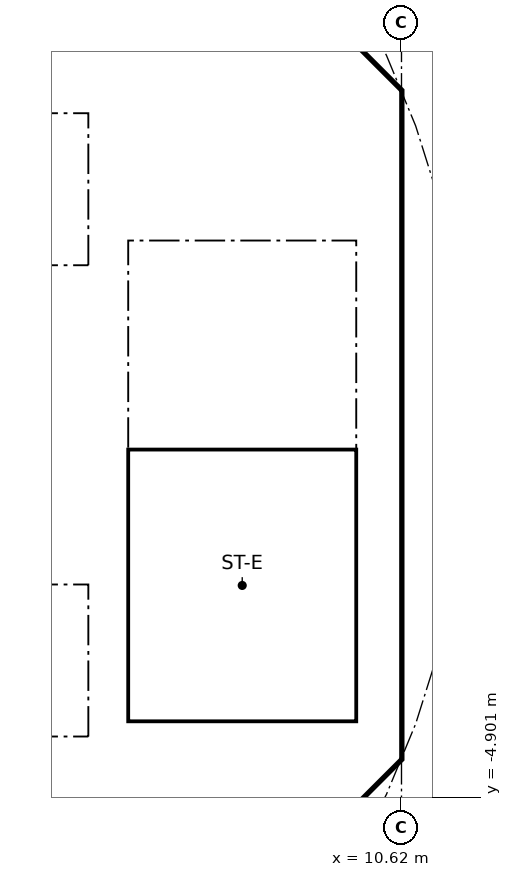
"""IFC4 building model, lengths in metres.
Left out: names, types, materials, properties, quantities, classifications, styles, units other than length and angle.
Written with IfcOpenShell. Run it as: python <this file> out.ifc"""

import sys

from ifc_helpers import new_model, si_unit, direction, frame, frame_2d, origin, place, context, subcontext, project, spatial, polyline, rectangle, outline, extrude, element, fill, save


model = new_model("IFC4")
c1 = context("Model", 3, precision=1e-05, world=origin(), true_north=direction((0.0, 1.0)))
c2 = subcontext(c1, "Body", "Model", "MODEL_VIEW")
j1 = project(units=[si_unit("LENGTHUNIT", "METRE"), si_unit("PLANEANGLEUNIT", "RADIAN")], contexts=[c1])
p1 = place(None, origin())
s1 = spatial("IfcSite", under=j1, at=p1, CompositionType="ELEMENT")
p2 = place(p1, origin())
s2 = spatial("IfcBuilding", under=s1, at=p2, CompositionType="ELEMENT")
p3 = place(p2, frame((0.0, 0.0, 295.5)))
s3 = spatial("IfcBuildingStorey", under=s2, at=p3, CompositionType="ELEMENT", Elevation=295.5)
p4 = place(p3, frame((9.988, 4.613, 0.0), z_axis=(0.0, 0.0, 1.0), x_axis=(-0.707106781187, 0.707106781187, 0.0)))
e1 = element("IfcWall", 1, at=p4, inside=s3, PredefinedType="SHEAR", context=c2, shape_type="SweptSolid", body=[
    extrude(rectangle(XDim=7.602, YDim=0.6, at=frame_2d((3.801, 0.0))), origin(), (0.0, 0.0, 1.0), 3.28),
])
p5 = place(p4, frame((3.201, 0.0, 0.0)))
e2 = element("IfcOpeningElement", 2, at=p5, cuts=e1, PredefinedType="OPENING", context=c2, shape_type="SweptSolid", body=[
    extrude(rectangle(XDim=1.2, YDim=2.1, at=frame_2d((0.6, 1.05))), frame((0.0, 0.31, 0.0), z_axis=(0.0, -1.0, 0.0), x_axis=(1.0, 0.0, 0.0)), (0.0, 0.0, 1.0), 0.62),
])
p6 = place(p3, frame((4.613, -9.988, 0.0), z_axis=(0.0, 0.0, 1.0), x_axis=(0.707106781187, 0.707106781187, 0.0)))
e3 = element("IfcWall", 3, at=p6, inside=s3, PredefinedType="SHEAR", context=c2, shape_type="SweptSolid", body=[
    extrude(rectangle(XDim=7.602, YDim=0.6, at=frame_2d((3.801, 0.0))), origin(), (0.0, 0.0, 1.0), 3.28),
])
p7 = place(p6, frame((3.201, 0.0, 0.0)))
e4 = element("IfcOpeningElement", 4, at=p7, cuts=e3, PredefinedType="OPENING", context=c2, shape_type="SweptSolid", body=[
    extrude(rectangle(XDim=1.2, YDim=2.1, at=frame_2d((0.6, 1.05))), frame((0.0, 0.31, 0.0), z_axis=(0.0, -1.0, 0.0), x_axis=(1.0, 0.0, 0.0)), (0.0, 0.0, 1.0), 0.62),
])
p8 = place(p3, frame((-6.7, 2.0, 0.0), z_axis=(0.0, 0.0, 1.0), x_axis=(1.0, 0.0, 0.0)))
e5 = element("IfcWall", 5, at=p8, inside=s3, PredefinedType="SOLIDWALL", context=c2, shape_type="SweptSolid", body=[
    extrude(rectangle(XDim=13.4, YDim=0.2, at=frame_2d((6.7, 0.0))), origin(), (0.0, 0.0, 1.0), 3.28),
])
p9 = place(p8, frame((11.65, 0.0, 0.0)))
e6 = element("IfcOpeningElement", 6, at=p9, cuts=e5, PredefinedType="OPENING", context=c2, shape_type="SweptSolid", body=[
    extrude(rectangle(XDim=1.1, YDim=2.1, at=frame_2d((0.55, 1.05))), frame((0.0, 0.11, 0.0), z_axis=(0.0, -1.0, 0.0), x_axis=(1.0, 0.0, 0.0)), (0.0, 0.0, 1.0), 0.22),
])
p10 = place(p8, frame((2.95, 0.0, 0.0)))
e7 = element("IfcOpeningElement", 7, at=p10, cuts=e5, PredefinedType="OPENING", context=c2, shape_type="SweptSolid", body=[
    extrude(rectangle(XDim=0.9, YDim=2.1, at=frame_2d((0.45, 1.05))), frame((0.0, 0.11, 0.0), z_axis=(0.0, -1.0, 0.0), x_axis=(1.0, 0.0, 0.0)), (0.0, 0.0, 1.0), 0.22),
])
p11 = place(p8, frame((8.45, 0.0, 0.0)))
e8 = element("IfcOpeningElement", 8, at=p11, cuts=e5, PredefinedType="OPENING", context=c2, shape_type="SweptSolid", body=[
    extrude(rectangle(XDim=0.9, YDim=2.1, at=frame_2d((0.45, 1.05))), frame((0.0, 0.11, 0.0), z_axis=(0.0, -1.0, 0.0), x_axis=(1.0, 0.0, 0.0)), (0.0, 0.0, 1.0), 0.22),
])
p12 = place(p3, frame((6.7, 4.0, 0.0), z_axis=(0.0, 0.0, 1.0), x_axis=(1.0, 0.0, 0.0)))
e9 = element("IfcWall", 9, at=p12, inside=s3, PredefinedType="SOLIDWALL", context=c2, shape_type="SweptSolid", body=[
    extrude(rectangle(XDim=3.325, YDim=0.2, at=frame_2d((1.662, 0.0))), origin(), (0.0, 0.0, 1.0), 3.28),
])
p13 = place(p12, frame((1.25, 0.0, 0.0)))
e10 = element("IfcOpeningElement", 10, at=p13, cuts=e9, PredefinedType="OPENING", context=c2, shape_type="SweptSolid", body=[
    extrude(rectangle(XDim=1.1, YDim=2.1, at=frame_2d((0.55, 1.05))), frame((0.0, 0.11, 0.0), z_axis=(0.0, -1.0, 0.0), x_axis=(1.0, 0.0, 0.0)), (0.0, 0.0, 1.0), 0.22),
])
p14 = place(p3, frame((-6.7, -2.0, 0.0), z_axis=(0.0, 0.0, 1.0), x_axis=(1.0, 0.0, 0.0)))
e11 = element("IfcWall", 11, at=p14, inside=s3, PredefinedType="SOLIDWALL", context=c2, shape_type="SweptSolid", body=[
    extrude(rectangle(XDim=13.4, YDim=0.2, at=frame_2d((6.7, 0.0))), origin(), (0.0, 0.0, 1.0), 3.28),
])
p15 = place(p14, frame((9.45, 0.0, 0.0)))
e12 = element("IfcOpeningElement", 12, at=p15, cuts=e11, PredefinedType="OPENING", context=c2, shape_type="SweptSolid", body=[
    extrude(rectangle(XDim=1.1, YDim=2.1, at=frame_2d((0.55, 1.05))), frame((0.0, 0.11, 0.0), z_axis=(0.0, -1.0, 0.0), x_axis=(1.0, 0.0, 0.0)), (0.0, 0.0, 1.0), 0.22),
])
p16 = place(p14, frame((11.65, 0.0, 0.0)))
e13 = element("IfcOpeningElement", 13, at=p16, cuts=e11, PredefinedType="OPENING", context=c2, shape_type="SweptSolid", body=[
    extrude(rectangle(XDim=1.1, YDim=2.1, at=frame_2d((0.55, 1.05))), frame((0.0, 0.11, 0.0), z_axis=(0.0, -1.0, 0.0), x_axis=(1.0, 0.0, 0.0)), (0.0, 0.0, 1.0), 0.22),
])
p17 = place(p14, frame((0.75, 0.0, 0.0)))
e14 = element("IfcOpeningElement", 14, at=p17, cuts=e11, PredefinedType="OPENING", context=c2, shape_type="SweptSolid", body=[
    extrude(rectangle(XDim=0.9, YDim=2.1, at=frame_2d((0.45, 1.05))), frame((0.0, 0.11, 0.0), z_axis=(0.0, -1.0, 0.0), x_axis=(1.0, 0.0, 0.0)), (0.0, 0.0, 1.0), 0.22),
])
p18 = place(p14, frame((2.95, 0.0, 0.0)))
e15 = element("IfcOpeningElement", 15, at=p18, cuts=e11, PredefinedType="OPENING", context=c2, shape_type="SweptSolid", body=[
    extrude(rectangle(XDim=0.9, YDim=2.1, at=frame_2d((0.45, 1.05))), frame((0.0, 0.11, 0.0), z_axis=(0.0, -1.0, 0.0), x_axis=(1.0, 0.0, 0.0)), (0.0, 0.0, 1.0), 0.22),
])
p19 = place(p14, frame((6.25, 0.0, 0.0)))
e16 = element("IfcOpeningElement", 16, at=p19, cuts=e11, PredefinedType="OPENING", context=c2, shape_type="SweptSolid", body=[
    extrude(rectangle(XDim=0.9, YDim=2.1, at=frame_2d((0.45, 1.05))), frame((0.0, 0.11, 0.0), z_axis=(0.0, -1.0, 0.0), x_axis=(1.0, 0.0, 0.0)), (0.0, 0.0, 1.0), 0.22),
])
p20 = place(p3, origin())
e17 = element("IfcWall", 17, at=p20, inside=s3, PredefinedType="SHEAR", context=c2, shape_type="SweptSolid", body=[
    extrude(outline(polyline([(9.776, -4.401), (10.025, -4.152), (10.025, -3.801), (10.025, 4.152), (9.776, 4.401), (10.2, 4.825), (10.625, 4.401), (10.625, -4.401), (10.2, -4.825), (9.776, -4.401)])), origin(), (0.0, 0.0, 1.0), 3.28),
])
p21 = place(p3, origin())
e18 = element("IfcWall", 18, at=p21, inside=s3, PredefinedType="SOLIDWALL", context=c2, shape_type="SweptSolid", body=[
    extrude(outline(polyline([(-6.7, -2.1), (-6.5, -2.1), (-6.5, -4.1), (-4.5, -4.1), (-4.5, -2.1), (-4.3, -2.1), (-4.3, -4.1), (-2.3, -4.1), (-2.3, -2.1), (-2.1, -2.1), (-2.1, -4.1), (2.1, -4.1), (2.1, -2.1), (2.3, -2.1), (2.3, -4.1), (4.3, -4.1), (4.3, -2.1), (4.5, -2.1), (4.5, -4.1), (6.5, -4.1), (6.5, -2.1), (6.7, -2.1), (6.7, -4.3), (-6.7, -4.3), (-6.7, -2.1)])), origin(), (0.0, 0.0, 1.0), 3.28),
])
p22 = place(p3, origin())
e19 = element("IfcWall", 19, at=p22, inside=s3, PredefinedType="SOLIDWALL", context=c2, shape_type="SweptSolid", body=[
    extrude(outline(polyline([(-6.7, 4.3), (6.7, 4.3), (6.7, 2.1), (6.5, 2.1), (6.5, 4.1), (4.5, 4.1), (4.5, 2.1), (4.3, 2.1), (4.3, 4.1), (0.1, 4.1), (0.1, 2.1), (-0.1, 2.1), (-0.1, 4.1), (-6.5, 4.1), (-6.5, 2.1), (-6.7, 2.1), (-6.7, 4.3)])), origin(), (0.0, 0.0, 1.0), 3.28),
])
p23 = place(p3, origin())
e20 = element("IfcWall", 20, at=p23, inside=s3, PredefinedType="SOLIDWALL", context=c2, shape_type="SweptSolid", body=[
    extrude(outline(polyline([(7.025, -3.9), (6.7, -3.9), (6.7, 3.9), (7.025, 3.9), (7.025, -3.9)])), origin(), (0.0, 0.0, 1.0), 3.28),
])
p24 = place(p3, origin())
e21 = element("IfcWall", 21, at=p24, inside=s3, PredefinedType="SOLIDWALL", context=c2, shape_type="SweptSolid", body=[
    extrude(outline(polyline([(10.025, -4.1), (6.7, -4.1), (6.7, -3.9), (10.025, -3.9), (10.025, -4.1)])), origin(), (0.0, 0.0, 1.0), 3.28),
])
p25 = place(p9, origin())
e22 = element("IfcDoor", 22, at=p25, inside=s3, OperationType="DOUBLE_DOOR_SLIDING", PredefinedType="DOOR", context=c2, shape_type="SweptSolid", body=[
    extrude(rectangle(XDim=1.1, YDim=2.1, at=frame_2d((0.55, 1.05))), frame((0.0, 0.025, 0.0), z_axis=(0.0, -1.0, 0.0), x_axis=(1.0, 0.0, 0.0)), (0.0, 0.0, 1.0), 0.05),
])
fill(e6, e22)
p26 = place(p16, origin())
e23 = element("IfcDoor", 23, at=p26, inside=s3, OperationType="DOUBLE_DOOR_SLIDING", PredefinedType="DOOR", context=c2, shape_type="SweptSolid", body=[
    extrude(rectangle(XDim=1.1, YDim=2.1, at=frame_2d((0.55, 1.05))), frame((0.0, 0.025, 0.0), z_axis=(0.0, -1.0, 0.0), x_axis=(1.0, 0.0, 0.0)), (0.0, 0.0, 1.0), 0.05),
])
fill(e13, e23)
p27 = place(p13, frame((1.1, 0.0, 0.0), x_axis=(-1.0, 0.0, 0.0)))
e24 = element("IfcDoor", 24, at=p27, inside=s3, OperationType="SINGLE_SWING_LEFT", PredefinedType="DOOR", context=c2, shape_type="SweptSolid", body=[
    extrude(rectangle(XDim=1.1, YDim=2.1, at=frame_2d((0.55, 1.05))), frame((0.0, 0.025, 0.0), z_axis=(0.0, -1.0, 0.0), x_axis=(1.0, 0.0, 0.0)), (0.0, 0.0, 1.0), 0.05),
])
fill(e10, e24)
save(model, sys.argv[1])
